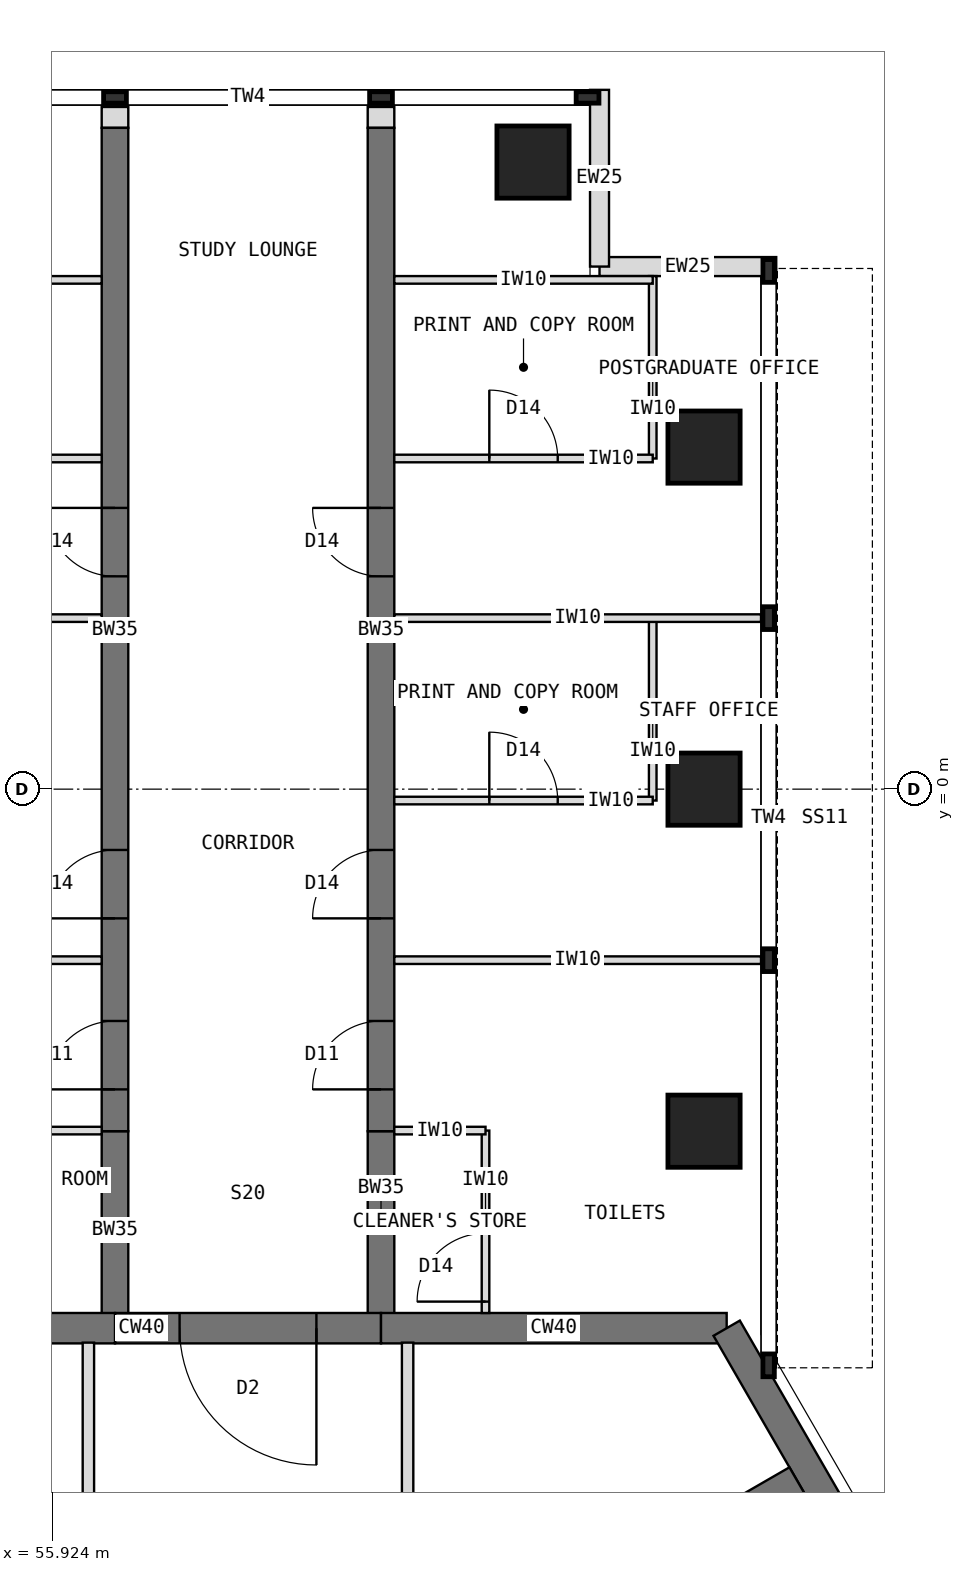
"""IFC4 building model, lengths in metres.
Left out: names, types, materials, properties, quantities, classifications, styles, units other than length and angle.
Written with IfcOpenShell. Run it as: python <this file> out.ifc"""

import sys

from ifc_helpers import new_model, si_unit, direction, frame, frame_2d, origin, origin_2d, place, context, subcontext, project, spatial, rectangle, extrude, element, fill, save


model = new_model("IFC4")
c1 = context("Model", 3, precision=1e-05, world=origin(), true_north=direction((0.0, 1.0)))
c2 = subcontext(c1, "Body", "Model", "MODEL_VIEW")
j1 = project(units=[si_unit("LENGTHUNIT", "METRE"), si_unit("PLANEANGLEUNIT", "RADIAN")], contexts=[c1])
p1 = place(None, origin())
s1 = spatial("IfcSite", under=j1, at=p1, CompositionType="ELEMENT")
p2 = place(p1, origin())
s2 = spatial("IfcBuilding", under=s1, at=p2, CompositionType="ELEMENT")
p3 = place(p2, frame((0.0, 0.0, 279.5)))
s3 = spatial("IfcBuildingStorey", under=s2, at=p3, CompositionType="ELEMENT", Elevation=279.5)
p4 = place(p3, frame((64.798, -7.092, 0.0), z_axis=(0.0, 0.0, 1.0), x_axis=(-1.0, 0.0, 0.0)))
e1 = element("IfcWall", 1, at=p4, inside=s3, PredefinedType="SHEAR", context=c2, shape_type="SweptSolid", body=[
    extrude(rectangle(XDim=4.548, YDim=0.4, at=frame_2d((2.274, 0.0))), origin(), (0.0, 0.0, 1.0), 4.0),
])
p5 = place(p3, frame((60.25, -7.092, 0.0), z_axis=(0.0, 0.0, 1.0), x_axis=(-1.0, 0.0, 0.0)))
e2 = element("IfcWall", 2, at=p5, inside=s3, PredefinedType="SHEAR", context=c2, shape_type="SweptSolid", body=[
    extrude(rectangle(XDim=3.5, YDim=0.4, at=frame_2d((1.75, 0.0))), origin(), (0.0, 0.0, 1.0), 4.0),
])
p6 = place(p5, frame((0.85, 0.0, 0.0)))
e3 = element("IfcOpeningElement", 3, at=p6, cuts=e2, PredefinedType="OPENING", context=c2, shape_type="SweptSolid", body=[
    extrude(rectangle(XDim=1.8, YDim=2.1, at=frame_2d((0.9, 1.05))), frame((0.0, 0.21, 0.0), z_axis=(0.0, -1.0, 0.0), x_axis=(1.0, 0.0, 0.0)), (0.0, 0.0, 1.0), 0.42),
])
p7 = place(p3, frame((56.75, -7.092, 0.0), z_axis=(0.0, 0.0, 1.0), x_axis=(-1.0, 0.0, 0.0)))
e4 = element("IfcWall", 4, at=p7, inside=s3, PredefinedType="SHEAR", context=c2, shape_type="SweptSolid", body=[
    extrude(rectangle(XDim=4.548, YDim=0.4, at=frame_2d((2.274, 0.0))), origin(), (0.0, 0.0, 1.0), 4.0),
])
p8 = place(p3, frame((71.096, -18.0, 0.0), z_axis=(0.0, 0.0, 1.0), x_axis=(-0.500005998175, 0.866021940709, 0.0)))
e5 = element("IfcWall", 5, at=p8, inside=s3, PredefinedType="SHEAR", context=c2, shape_type="SweptSolid", body=[
    extrude(rectangle(XDim=12.596, YDim=0.4, at=frame_2d((6.298, 0.0))), origin(), (0.0, 0.0, 1.0), 4.0),
])
p9 = place(p3, frame((56.75, -7.092, 0.0), z_axis=(0.0, 0.0, 1.0), x_axis=(0.0, 1.0, 0.0)))
e6 = element("IfcWall", 6, at=p9, inside=s3, PredefinedType="SHEAR", context=c2, shape_type="SweptSolid", body=[
    extrude(rectangle(XDim=2.592, YDim=0.35, at=frame_2d((1.296, 0.0))), origin(), (0.0, 0.0, 1.0), 4.0),
])
p10 = place(p3, frame((56.75, -4.5, 0.0), z_axis=(0.0, 0.0, 1.0), x_axis=(0.0, 1.0, 0.0)))
e7 = element("IfcWall", 7, at=p10, inside=s3, PredefinedType="SHEAR", context=c2, shape_type="SweptSolid", body=[
    extrude(rectangle(XDim=13.2, YDim=0.35, at=frame_2d((6.6, 0.0))), origin(), (0.0, 0.0, 1.0), 4.0),
])
p11 = place(p10, frame((0.55, 0.0, 0.0)))
e8 = element("IfcOpeningElement", 8, at=p11, cuts=e7, PredefinedType="OPENING", context=c2, shape_type="SweptSolid", body=[
    extrude(rectangle(XDim=0.9, YDim=2.1, at=frame_2d((0.45, 1.05))), frame((0.0, 0.185, 0.0), z_axis=(0.0, -1.0, 0.0), x_axis=(1.0, 0.0, 0.0)), (0.0, 0.0, 1.0), 0.37),
])
p12 = place(p10, frame((2.8, 0.0, 0.0)))
e9 = element("IfcOpeningElement", 9, at=p12, cuts=e7, PredefinedType="OPENING", context=c2, shape_type="SweptSolid", body=[
    extrude(rectangle(XDim=0.9, YDim=2.1, at=frame_2d((0.45, 1.05))), frame((0.0, 0.185, 0.0), z_axis=(0.0, -1.0, 0.0), x_axis=(1.0, 0.0, 0.0)), (0.0, 0.0, 1.0), 0.37),
])
p13 = place(p10, frame((7.3, 0.0, 0.0)))
e10 = element("IfcOpeningElement", 10, at=p13, cuts=e7, PredefinedType="OPENING", context=c2, shape_type="SweptSolid", body=[
    extrude(rectangle(XDim=0.9, YDim=2.1, at=frame_2d((0.45, 1.05))), frame((0.0, 0.185, 0.0), z_axis=(0.0, -1.0, 0.0), x_axis=(1.0, 0.0, 0.0)), (0.0, 0.0, 1.0), 0.37),
])
p14 = place(p3, frame((60.25, -7.092, 0.0), z_axis=(0.0, 0.0, 1.0), x_axis=(0.0, 1.0, 0.0)))
e11 = element("IfcWall", 11, at=p14, inside=s3, PredefinedType="SHEAR", context=c2, shape_type="SweptSolid", body=[
    extrude(rectangle(XDim=2.592, YDim=0.35, at=frame_2d((1.296, 0.0))), origin(), (0.0, 0.0, 1.0), 4.0),
])
p15 = place(p3, frame((60.25, -4.5, 0.0), z_axis=(0.0, 0.0, 1.0), x_axis=(0.0, 1.0, 0.0)))
e12 = element("IfcWall", 12, at=p15, inside=s3, PredefinedType="SHEAR", context=c2, shape_type="SweptSolid", body=[
    extrude(rectangle(XDim=13.2, YDim=0.35, at=frame_2d((6.6, 0.0))), origin(), (0.0, 0.0, 1.0), 4.0),
])
p16 = place(p15, frame((0.55, 0.0, 0.0)))
e13 = element("IfcOpeningElement", 13, at=p16, cuts=e12, PredefinedType="OPENING", context=c2, shape_type="SweptSolid", body=[
    extrude(rectangle(XDim=0.9, YDim=2.1, at=frame_2d((0.45, 1.05))), frame((0.0, 0.185, 0.0), z_axis=(0.0, -1.0, 0.0), x_axis=(1.0, 0.0, 0.0)), (0.0, 0.0, 1.0), 0.37),
])
p17 = place(p15, frame((2.8, 0.0, 0.0)))
e14 = element("IfcOpeningElement", 14, at=p17, cuts=e12, PredefinedType="OPENING", context=c2, shape_type="SweptSolid", body=[
    extrude(rectangle(XDim=0.9, YDim=2.1, at=frame_2d((0.45, 1.05))), frame((0.0, 0.185, 0.0), z_axis=(0.0, -1.0, 0.0), x_axis=(1.0, 0.0, 0.0)), (0.0, 0.0, 1.0), 0.37),
])
p18 = place(p15, frame((7.3, 0.0, 0.0)))
e15 = element("IfcOpeningElement", 15, at=p18, cuts=e12, PredefinedType="OPENING", context=c2, shape_type="SweptSolid", body=[
    extrude(rectangle(XDim=0.9, YDim=2.1, at=frame_2d((0.45, 1.05))), frame((0.0, 0.185, 0.0), z_axis=(0.0, -1.0, 0.0), x_axis=(1.0, 0.0, 0.0)), (0.0, 0.0, 1.0), 0.37),
])
for number, where, z_axis, x_axis in (
    (16, (64.5, -4.5, 0.0), (0.0, 0.0, 1.0), (1.0, 0.0, 0.0)),
    (17, (64.5, 0.0, 0.0), (0.0, 0.0, 1.0), (1.0, 0.0, 0.0)),
    (18, (64.5, 4.5, 0.0), (0.0, 0.0, 1.0), (1.0, 0.0, 0.0)),
    (19, (62.25, 8.25, 0.0), (0.0, 0.0, 1.0), (1.0, 0.0, 0.0)),
):
    element("IfcColumn", number, at=place(p3, frame(where, z_axis=z_axis, x_axis=x_axis)), inside=s3, PredefinedType="COLUMN", context=c2, shape_type="SweptSolid", body=[
        extrude(rectangle(XDim=0.95, YDim=0.95, at=origin_2d()), origin(), (0.0, 0.0, 1.0), 4.0),
    ])
for number, where, z_axis, x_axis in (
    (20, (65.45, 6.875, 0.0), (0.0, 0.0, 1.0), (-1.0, 0.0, 0.0)),
    (21, (63.125, 6.875, 0.0), (0.0, 0.0, 1.0), (0.0, 1.0, 0.0)),
):
    element("IfcWall", number, at=place(p3, frame(where, z_axis=z_axis, x_axis=x_axis)), inside=s3, PredefinedType="STANDARD", context=c2, shape_type="SweptSolid", body=[
        extrude(rectangle(XDim=2.325, YDim=0.25, at=frame_2d((1.163, 0.0))), origin(), (0.0, 0.0, 1.0), 3.8),
    ])
for number, where, z_axis, x_axis in (
    (22, (56.75, 8.7, 0.0), (0.0, 0.0, 1.0), (0.0, 1.0, 0.0)),
    (23, (60.25, 8.7, 0.0), (0.0, 0.0, 1.0), (0.0, 1.0, 0.0)),
):
    element("IfcWall", number, at=place(p3, frame(where, z_axis=z_axis, x_axis=x_axis)), inside=s3, PredefinedType="PARTITIONING", context=c2, shape_type="SweptSolid", body=[
        extrude(rectangle(XDim=0.275, YDim=0.35, at=frame_2d((0.138, 0.0))), origin(), (0.0, 0.0, 1.0), 3.8),
    ])
for number, where, z_axis, x_axis in (
    (24, (56.48, -12.099, 0.0), (0.0, 0.0, 1.0), (-0.866, 0.5, 0.0)),
    (25, (60.52, -12.099, 0.0), (0.0, 0.0, 1.0), (0.866, 0.5, 0.0)),
):
    element("IfcWall", number, at=place(p3, frame(where, z_axis=z_axis, x_axis=x_axis)), inside=s3, PredefinedType="SHEAR", context=c2, shape_type="SweptSolid", body=[
        extrude(rectangle(XDim=6.008, YDim=0.4, at=frame_2d((3.004, 0.0))), origin(), (0.0, 0.0, 1.0), 4.0),
    ])
for number, where, z_axis, x_axis in (
    (26, (56.575, -2.25, 0.0), (0.0, 0.0, 1.0), (-1.0, 0.0, 0.0)),
    (27, (56.575, 2.25, 0.0), (0.0, 0.0, 1.0), (-1.0, 0.0, 0.0)),
):
    element("IfcWall", number, at=place(p3, frame(where, z_axis=z_axis, x_axis=x_axis)), inside=s3, PredefinedType="PARTITIONING", context=c2, shape_type="SweptSolid", body=[
        extrude(rectangle(XDim=4.825, YDim=0.1, at=frame_2d((2.413, 0.0))), origin(), (0.0, 0.0, 1.0), 3.8),
    ])
p19 = place(p3, frame((56.575, 4.35, 0.0), z_axis=(0.0, 0.0, 1.0), x_axis=(-1.0, 0.0, 0.0)))
e28 = element("IfcWall", 28, at=p19, inside=s3, PredefinedType="PARTITIONING", context=c2, shape_type="SweptSolid", body=[
    extrude(rectangle(XDim=3.4, YDim=0.1, at=frame_2d((1.7, 0.0))), origin(), (0.0, 0.0, 1.0), 3.8),
])
p20 = place(p19, frame((1.25, 0.0, 0.0)))
e29 = element("IfcOpeningElement", 29, at=p20, cuts=e28, PredefinedType="OPENING", context=c2, shape_type="SweptSolid", body=[
    extrude(rectangle(XDim=0.9, YDim=2.1, at=frame_2d((0.45, 1.05))), frame((0.0, 0.06, 0.0), z_axis=(0.0, -1.0, 0.0), x_axis=(1.0, 0.0, 0.0)), (0.0, 0.0, 1.0), 0.12),
])
p21 = place(p3, frame((56.575, 6.7, 0.0), z_axis=(0.0, 0.0, 1.0), x_axis=(-1.0, 0.0, 0.0)))
e30 = element("IfcWall", 30, at=p21, inside=s3, PredefinedType="PARTITIONING", context=c2, shape_type="SweptSolid", body=[
    extrude(rectangle(XDim=3.4, YDim=0.1, at=frame_2d((1.7, 0.0))), origin(), (0.0, 0.0, 1.0), 3.8),
])
p22 = place(p3, frame((56.575, -4.492, 0.0), z_axis=(0.0, 0.0, 1.0), x_axis=(-1.0, 0.0, 0.0)))
e31 = element("IfcWall", 31, at=p22, inside=s3, PredefinedType="PARTITIONING", context=c2, shape_type="SweptSolid", body=[
    extrude(rectangle(XDim=3.2, YDim=0.1, at=frame_2d((1.6, 0.0))), origin(), (0.0, 0.0, 1.0), 3.267),
])
for number, where, z_axis, x_axis in (
    (32, (60.425, -2.25, 0.0), (0.0, 0.0, 1.0), (1.0, 0.0, 0.0)),
    (33, (60.425, 2.25, 0.0), (0.0, 0.0, 1.0), (1.0, 0.0, 0.0)),
):
    element("IfcWall", number, at=place(p3, frame(where, z_axis=z_axis, x_axis=x_axis)), inside=s3, PredefinedType="PARTITIONING", context=c2, shape_type="SweptSolid", body=[
        extrude(rectangle(XDim=4.825, YDim=0.1, at=frame_2d((2.413, 0.0))), origin(), (0.0, 0.0, 1.0), 3.8),
    ])
p23 = place(p3, frame((63.825, -0.15, 0.0), z_axis=(0.0, 0.0, 1.0), x_axis=(0.0, 1.0, 0.0)))
e34 = element("IfcWall", 34, at=p23, inside=s3, PredefinedType="PARTITIONING", context=c2, shape_type="SweptSolid", body=[
    extrude(rectangle(XDim=2.4, YDim=0.1, at=frame_2d((1.2, 0.0))), origin(), (0.0, 0.0, 1.0), 3.8),
])
p24 = place(p3, frame((60.425, -0.15, 0.0), z_axis=(0.0, 0.0, 1.0), x_axis=(1.0, 0.0, 0.0)))
e35 = element("IfcWall", 35, at=p24, inside=s3, PredefinedType="PARTITIONING", context=c2, shape_type="SweptSolid", body=[
    extrude(rectangle(XDim=3.4, YDim=0.1, at=frame_2d((1.7, 0.0))), origin(), (0.0, 0.0, 1.0), 3.8),
])
p25 = place(p24, frame((1.25, 0.0, 0.0)))
e36 = element("IfcOpeningElement", 36, at=p25, cuts=e35, PredefinedType="OPENING", context=c2, shape_type="SweptSolid", body=[
    extrude(rectangle(XDim=0.9, YDim=2.1, at=frame_2d((0.45, 1.05))), frame((0.0, 0.06, 0.0), z_axis=(0.0, -1.0, 0.0), x_axis=(1.0, 0.0, 0.0)), (0.0, 0.0, 1.0), 0.12),
])
p26 = place(p3, frame((63.825, 4.35, 0.0), z_axis=(0.0, 0.0, 1.0), x_axis=(0.0, 1.0, 0.0)))
e37 = element("IfcWall", 37, at=p26, inside=s3, PredefinedType="PARTITIONING", context=c2, shape_type="SweptSolid", body=[
    extrude(rectangle(XDim=2.4, YDim=0.1, at=frame_2d((1.2, 0.0))), origin(), (0.0, 0.0, 1.0), 3.8),
])
p27 = place(p3, frame((60.425, 4.35, 0.0), z_axis=(0.0, 0.0, 1.0), x_axis=(1.0, 0.0, 0.0)))
e38 = element("IfcWall", 38, at=p27, inside=s3, PredefinedType="PARTITIONING", context=c2, shape_type="SweptSolid", body=[
    extrude(rectangle(XDim=3.4, YDim=0.1, at=frame_2d((1.7, 0.0))), origin(), (0.0, 0.0, 1.0), 3.8),
])
p28 = place(p27, frame((1.25, 0.0, 0.0)))
e39 = element("IfcOpeningElement", 39, at=p28, cuts=e38, PredefinedType="OPENING", context=c2, shape_type="SweptSolid", body=[
    extrude(rectangle(XDim=0.9, YDim=2.1, at=frame_2d((0.45, 1.05))), frame((0.0, 0.06, 0.0), z_axis=(0.0, -1.0, 0.0), x_axis=(1.0, 0.0, 0.0)), (0.0, 0.0, 1.0), 0.12),
])
p29 = place(p3, frame((60.425, 6.7, 0.0), z_axis=(0.0, 0.0, 1.0), x_axis=(1.0, 0.0, 0.0)))
e40 = element("IfcWall", 40, at=p29, inside=s3, PredefinedType="PARTITIONING", context=c2, shape_type="SweptSolid", body=[
    extrude(rectangle(XDim=3.4, YDim=0.1, at=frame_2d((1.7, 0.0))), origin(), (0.0, 0.0, 1.0), 3.8),
])
p30 = place(p3, frame((61.625, -6.892, 0.0), z_axis=(0.0, 0.0, 1.0), x_axis=(0.0, 1.0, 0.0)))
e41 = element("IfcWall", 41, at=p30, inside=s3, PredefinedType="PARTITIONING", context=c2, shape_type="SweptSolid", body=[
    extrude(rectangle(XDim=2.4, YDim=0.1, at=frame_2d((1.2, 0.0))), origin(), (0.0, 0.0, 1.0), 3.8),
])
p31 = place(p30, frame((0.15, 0.0, 0.0)))
e42 = element("IfcOpeningElement", 42, at=p31, cuts=e41, PredefinedType="OPENING", context=c2, shape_type="SweptSolid", body=[
    extrude(rectangle(XDim=0.9, YDim=2.1, at=frame_2d((0.45, 1.05))), frame((0.0, 0.06, 0.0), z_axis=(0.0, -1.0, 0.0), x_axis=(1.0, 0.0, 0.0)), (0.0, 0.0, 1.0), 0.12),
])
p32 = place(p3, frame((60.425, -4.492, 0.0), z_axis=(0.0, 0.0, 1.0), x_axis=(1.0, 0.0, 0.0)))
e43 = element("IfcWall", 43, at=p32, inside=s3, PredefinedType="PARTITIONING", context=c2, shape_type="SweptSolid", body=[
    extrude(rectangle(XDim=1.2, YDim=0.1, at=frame_2d((0.6, 0.0))), origin(), (0.0, 0.0, 1.0), 3.267),
])
p33 = place(p3, frame((56.4, -11.857, 0.0), z_axis=(0.0, 0.0, 1.0), x_axis=(0.0, 1.0, 0.0)))
e44 = element("IfcWall", 44, at=p33, inside=s3, PredefinedType="PARTITIONING", context=c2, shape_type="SweptSolid", body=[
    extrude(rectangle(XDim=4.576, YDim=0.15, at=frame_2d((2.288, 0.0))), origin(), (0.0, 0.0, 1.0), 3.8),
])
p34 = place(p33, frame((0.873, 0.0, 0.0)))
e45 = element("IfcOpeningElement", 45, at=p34, cuts=e44, PredefinedType="OPENING", context=c2, shape_type="SweptSolid", body=[
    extrude(rectangle(XDim=1.0, YDim=2.1, at=frame_2d((0.5, 1.05))), frame((0.0, 0.085, 0.0), z_axis=(0.0, -1.0, 0.0), x_axis=(1.0, 0.0, 0.0)), (0.0, 0.0, 1.0), 0.17),
])
p35 = place(p3, frame((60.6, -7.282, 0.0), z_axis=(0.0, 0.0, 1.0), x_axis=(0.0, -1.0, 0.0)))
e46 = element("IfcWall", 46, at=p35, inside=s3, PredefinedType="PARTITIONING", context=c2, shape_type="SweptSolid", body=[
    extrude(rectangle(XDim=4.576, YDim=0.15, at=frame_2d((2.288, 0.0))), origin(), (0.0, 0.0, 1.0), 3.8),
])
p36 = place(p35, frame((2.703, 0.0, 0.0)))
e47 = element("IfcOpeningElement", 47, at=p36, cuts=e46, PredefinedType="OPENING", context=c2, shape_type="SweptSolid", body=[
    extrude(rectangle(XDim=1.0, YDim=2.1, at=frame_2d((0.5, 1.05))), frame((0.0, 0.085, 0.0), z_axis=(0.0, -1.0, 0.0), x_axis=(1.0, 0.0, 0.0)), (0.0, 0.0, 1.0), 0.17),
])
p37 = place(p6, origin())
e48 = element("IfcDoor", 48, at=p37, inside=s3, OperationType="DOUBLE_DOOR_DOUBLE_SWING", PredefinedType="DOOR", context=c2, shape_type="SweptSolid", body=[
    extrude(rectangle(XDim=1.8, YDim=2.1, at=frame_2d((0.9, 1.05))), frame((0.0, 0.025, 0.0), z_axis=(0.0, -1.0, 0.0), x_axis=(1.0, 0.0, 0.0)), (0.0, 0.0, 1.0), 0.05),
])
fill(e3, e48)
p38 = place(p25, origin())
e49 = element("IfcDoor", 49, at=p38, inside=s3, OperationType="SINGLE_SWING_LEFT", PredefinedType="DOOR", context=c2, shape_type="SweptSolid", body=[
    extrude(rectangle(XDim=0.9, YDim=2.1, at=frame_2d((0.45, 1.05))), frame((0.0, 0.025, 0.0), z_axis=(0.0, -1.0, 0.0), x_axis=(1.0, 0.0, 0.0)), (0.0, 0.0, 1.0), 0.05),
])
fill(e36, e49)
p39 = place(p28, origin())
e50 = element("IfcDoor", 50, at=p39, inside=s3, OperationType="SINGLE_SWING_LEFT", PredefinedType="DOOR", context=c2, shape_type="SweptSolid", body=[
    extrude(rectangle(XDim=0.9, YDim=2.1, at=frame_2d((0.45, 1.05))), frame((0.0, 0.025, 0.0), z_axis=(0.0, -1.0, 0.0), x_axis=(1.0, 0.0, 0.0)), (0.0, 0.0, 1.0), 0.05),
])
fill(e39, e50)
p40 = place(p31, origin())
e51 = element("IfcDoor", 51, at=p40, inside=s3, OperationType="SINGLE_SWING_LEFT", PredefinedType="DOOR", context=c2, shape_type="SweptSolid", body=[
    extrude(rectangle(XDim=0.9, YDim=2.1, at=frame_2d((0.45, 1.05))), frame((0.0, 0.025, 0.0), z_axis=(0.0, -1.0, 0.0), x_axis=(1.0, 0.0, 0.0)), (0.0, 0.0, 1.0), 0.05),
])
fill(e42, e51)
p41 = place(p11, origin())
e52 = element("IfcDoor", 52, at=p41, inside=s3, OperationType="SINGLE_SWING_LEFT", PredefinedType="DOOR", context=c2, shape_type="SweptSolid", body=[
    extrude(rectangle(XDim=0.9, YDim=2.1, at=frame_2d((0.45, 1.05))), frame((0.0, 0.025, 0.0), z_axis=(0.0, -1.0, 0.0), x_axis=(1.0, 0.0, 0.0)), (0.0, 0.0, 1.0), 0.05),
])
fill(e8, e52)
p42 = place(p12, origin())
e53 = element("IfcDoor", 53, at=p42, inside=s3, OperationType="SINGLE_SWING_LEFT", PredefinedType="DOOR", context=c2, shape_type="SweptSolid", body=[
    extrude(rectangle(XDim=0.9, YDim=2.1, at=frame_2d((0.45, 1.05))), frame((0.0, 0.025, 0.0), z_axis=(0.0, -1.0, 0.0), x_axis=(1.0, 0.0, 0.0)), (0.0, 0.0, 1.0), 0.05),
])
fill(e9, e53)
p43 = place(p13, origin())
e54 = element("IfcDoor", 54, at=p43, inside=s3, OperationType="SINGLE_SWING_RIGHT", PredefinedType="DOOR", context=c2, shape_type="SweptSolid", body=[
    extrude(rectangle(XDim=0.9, YDim=2.1, at=frame_2d((0.45, 1.05))), frame((0.0, 0.025, 0.0), z_axis=(0.0, -1.0, 0.0), x_axis=(1.0, 0.0, 0.0)), (0.0, 0.0, 1.0), 0.05),
])
fill(e10, e54)
p44 = place(p16, origin())
e55 = element("IfcDoor", 55, at=p44, inside=s3, OperationType="SINGLE_SWING_LEFT", PredefinedType="DOOR", context=c2, shape_type="SweptSolid", body=[
    extrude(rectangle(XDim=0.9, YDim=2.1, at=frame_2d((0.45, 1.05))), frame((0.0, 0.025, 0.0), z_axis=(0.0, -1.0, 0.0), x_axis=(1.0, 0.0, 0.0)), (0.0, 0.0, 1.0), 0.05),
])
fill(e13, e55)
p45 = place(p17, origin())
e56 = element("IfcDoor", 56, at=p45, inside=s3, OperationType="SINGLE_SWING_LEFT", PredefinedType="DOOR", context=c2, shape_type="SweptSolid", body=[
    extrude(rectangle(XDim=0.9, YDim=2.1, at=frame_2d((0.45, 1.05))), frame((0.0, 0.025, 0.0), z_axis=(0.0, -1.0, 0.0), x_axis=(1.0, 0.0, 0.0)), (0.0, 0.0, 1.0), 0.05),
])
fill(e14, e56)
p46 = place(p18, origin())
e57 = element("IfcDoor", 57, at=p46, inside=s3, OperationType="SINGLE_SWING_RIGHT", PredefinedType="DOOR", context=c2, shape_type="SweptSolid", body=[
    extrude(rectangle(XDim=0.9, YDim=2.1, at=frame_2d((0.45, 1.05))), frame((0.0, 0.025, 0.0), z_axis=(0.0, -1.0, 0.0), x_axis=(1.0, 0.0, 0.0)), (0.0, 0.0, 1.0), 0.05),
])
fill(e15, e57)
save(model, sys.argv[1])
